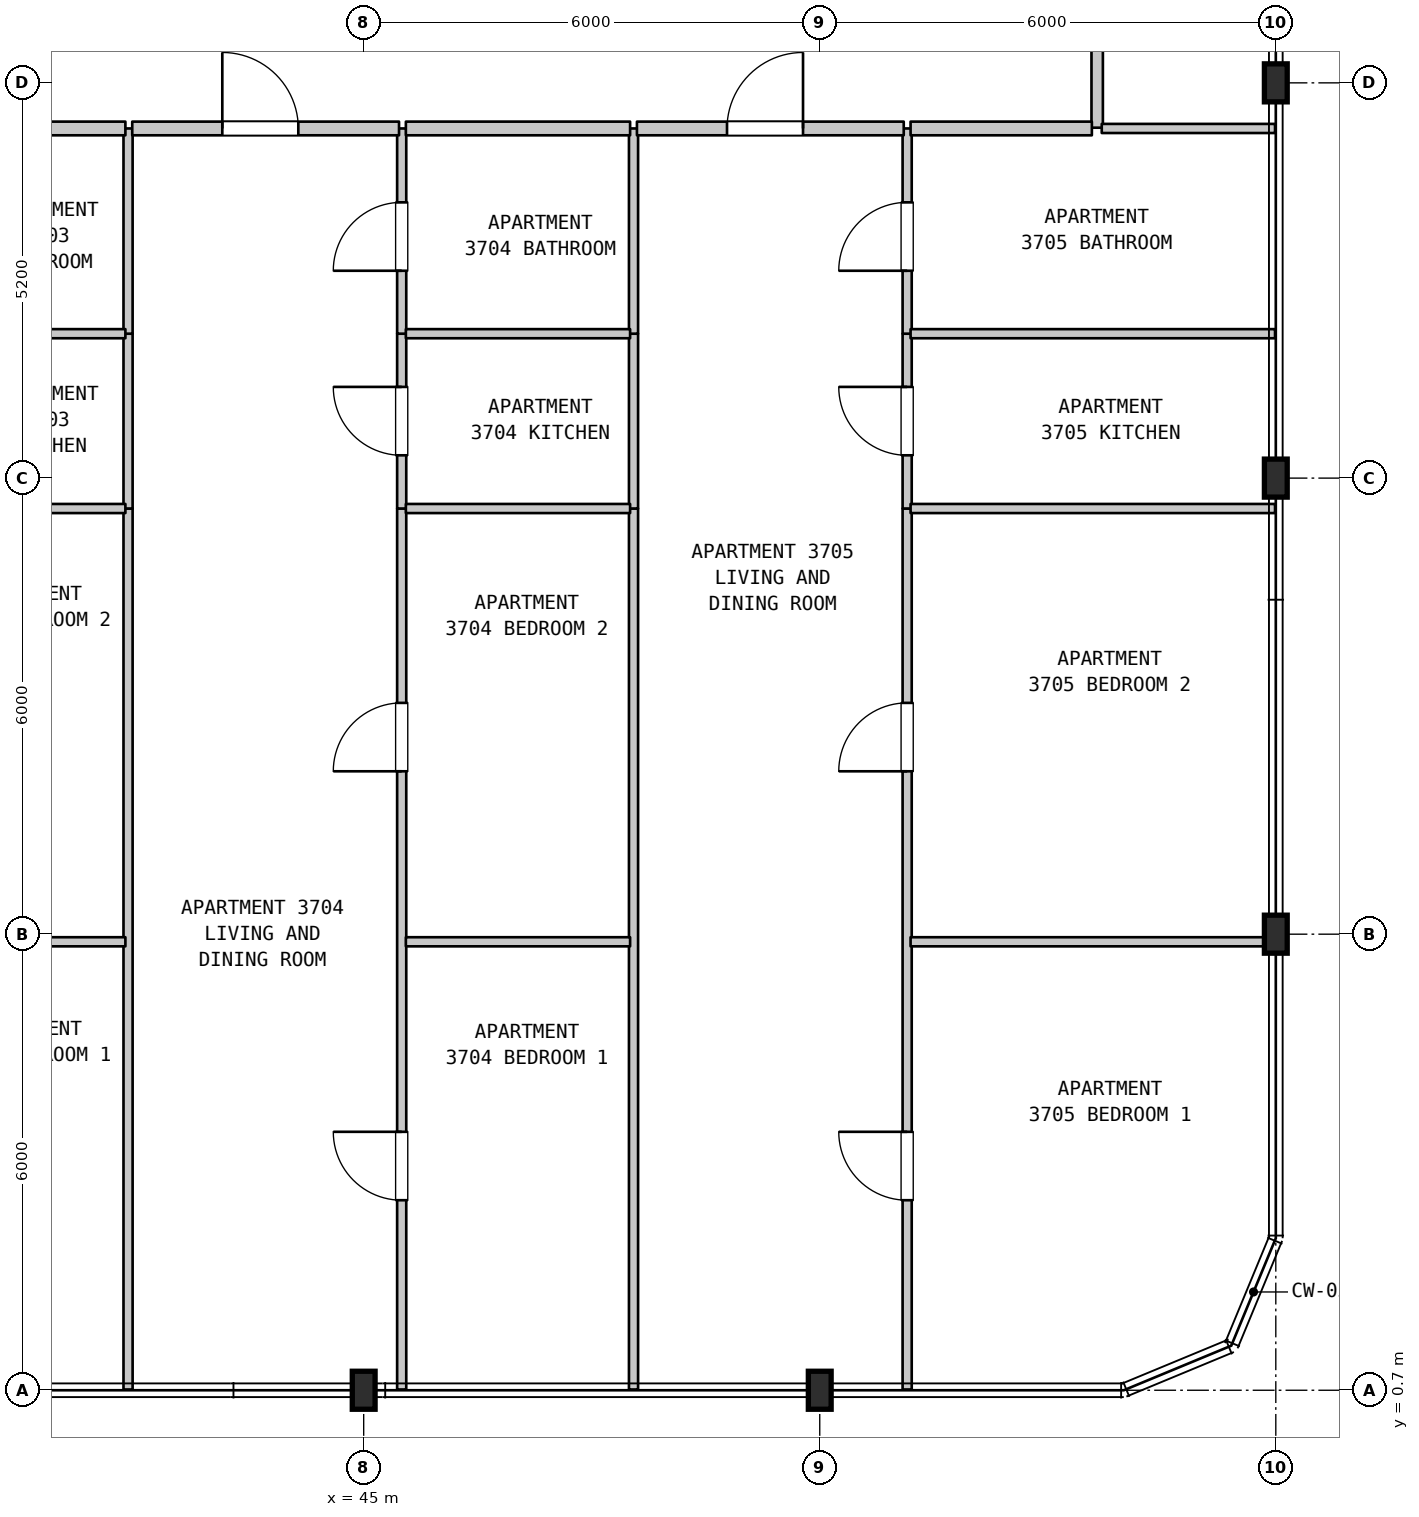
"""IFC4 building model, lengths in metres.
Left out: names, types, materials, properties, quantities, classifications, styles, units other than length and angle.
Written with IfcOpenShell. Run it as: python <this file> out.ifc"""

import sys

from ifc_helpers import new_model, si_unit, direction, frame, frame_2d, origin, origin_2d, place, context, subcontext, project, spatial, rectangle, i_section, extrude, element, fill, save


model = new_model("IFC4")
c1 = context("Model", 3, precision=1e-05, world=origin(), true_north=direction((0.0, 1.0)))
c2 = subcontext(c1, "Body", "Model", "MODEL_VIEW")
j1 = project(units=[si_unit("LENGTHUNIT", "METRE"), si_unit("PLANEANGLEUNIT", "RADIAN")], contexts=[c1])
p1 = place(None, origin())
s1 = spatial("IfcSite", under=j1, at=p1, CompositionType="ELEMENT")
p2 = place(p1, origin())
s2 = spatial("IfcBuilding", under=s1, at=p2, CompositionType="ELEMENT")
p3 = place(p2, frame((0.0, 0.0, 152.0)))
s3 = spatial("IfcBuildingStorey", under=s2, at=p3, CompositionType="ELEMENT", Elevation=152.0)
for number, where, z_axis, x_axis in (
    (1, (45.0, 0.7, 0.0), (0.0, 0.0, 1.0), (1.0, 0.0, 0.0)),
    (2, (51.0, 0.7, 0.0), (0.0, 0.0, 1.0), (1.0, 0.0, 0.0)),
    (3, (57.0, 6.7, 0.0), (0.0, 0.0, 1.0), (1.0, 0.0, 0.0)),
    (4, (57.0, 12.7, 0.0), (0.0, 0.0, 1.0), (1.0, 0.0, 0.0)),
    (5, (57.0, 17.9, 0.0), (0.0, 0.0, 1.0), (1.0, 0.0, 0.0)),
):
    element("IfcColumn", number, at=place(p3, frame(where, z_axis=z_axis, x_axis=x_axis)), inside=s3, PredefinedType="COLUMN", context=c2, shape_type="SweptSolid", body=[
        extrude(i_section(OverallWidth=0.3, OverallDepth=0.5, WebThickness=0.014, FlangeThickness=0.028, FilletRadius=0.027, at=origin_2d()), origin(), (0.0, 0.0, 1.0), 3.7),
    ])
p4 = place(p3, frame((41.9, 0.71, 0.0), z_axis=(0.0, 0.0, 1.0), x_axis=(0.0, 1.0, 0.0)))
e6 = element("IfcWall", 6, at=p4, inside=s3, PredefinedType="PARTITIONING", context=c2, shape_type="SweptSolid", body=[
    extrude(rectangle(XDim=11.59, YDim=0.12, at=frame_2d((5.795, 0.0))), origin(), (0.0, 0.0, 1.0), 3.385),
])
p5 = place(p3, frame((41.9, 12.3, 0.0), z_axis=(0.0, 0.0, 1.0), x_axis=(0.0, 1.0, 0.0)))
e7 = element("IfcWall", 7, at=p5, inside=s3, PredefinedType="PARTITIONING", context=c2, shape_type="SweptSolid", body=[
    extrude(rectangle(XDim=2.3, YDim=0.12, at=frame_2d((1.15, 0.0))), origin(), (0.0, 0.0, 1.0), 3.385),
])
p6 = place(p3, frame((41.9, 14.6, 0.0), z_axis=(0.0, 0.0, 1.0), x_axis=(0.0, 1.0, 0.0)))
e8 = element("IfcWall", 8, at=p6, inside=s3, PredefinedType="PARTITIONING", context=c2, shape_type="SweptSolid", body=[
    extrude(rectangle(XDim=2.7, YDim=0.12, at=frame_2d((1.35, 0.0))), origin(), (0.0, 0.0, 1.0), 3.385),
])
p7 = place(p3, frame((45.5, 0.71, 0.0), z_axis=(0.0, 0.0, 1.0), x_axis=(0.0, 1.0, 0.0)))
e9 = element("IfcWall", 9, at=p7, inside=s3, PredefinedType="PARTITIONING", context=c2, shape_type="SweptSolid", body=[
    extrude(rectangle(XDim=11.59, YDim=0.12, at=frame_2d((5.795, 0.0))), origin(), (0.0, 0.0, 1.0), 3.385),
])
p8 = place(p7, frame((2.49, 0.0, 0.0)))
e10 = element("IfcOpeningElement", 10, at=p8, cuts=e9, PredefinedType="OPENING", context=c2, shape_type="SweptSolid", body=[
    extrude(rectangle(XDim=0.9, YDim=2.15, at=frame_2d((0.45, 1.075))), frame((0.0, 0.07, 0.0), z_axis=(0.0, -1.0, 0.0), x_axis=(1.0, 0.0, 0.0)), (0.0, 0.0, 1.0), 0.14),
])
p9 = place(p7, frame((8.133, 0.0, 0.0)))
e11 = element("IfcOpeningElement", 11, at=p9, cuts=e9, PredefinedType="OPENING", context=c2, shape_type="SweptSolid", body=[
    extrude(rectangle(XDim=0.9, YDim=2.15, at=frame_2d((0.45, 1.075))), frame((0.0, 0.07, 0.0), z_axis=(0.0, -1.0, 0.0), x_axis=(1.0, 0.0, 0.0)), (0.0, 0.0, 1.0), 0.14),
])
p10 = place(p3, frame((45.5, 12.3, 0.0), z_axis=(0.0, 0.0, 1.0), x_axis=(0.0, 1.0, 0.0)))
e12 = element("IfcWall", 12, at=p10, inside=s3, PredefinedType="PARTITIONING", context=c2, shape_type="SweptSolid", body=[
    extrude(rectangle(XDim=2.3, YDim=0.12, at=frame_2d((1.15, 0.0))), origin(), (0.0, 0.0, 1.0), 3.385),
])
p11 = place(p10, frame((0.7, 0.0, 0.0)))
e13 = element("IfcOpeningElement", 13, at=p11, cuts=e12, PredefinedType="OPENING", context=c2, shape_type="SweptSolid", body=[
    extrude(rectangle(XDim=0.9, YDim=2.15, at=frame_2d((0.45, 1.075))), frame((0.0, 0.07, 0.0), z_axis=(0.0, -1.0, 0.0), x_axis=(1.0, 0.0, 0.0)), (0.0, 0.0, 1.0), 0.14),
])
p12 = place(p3, frame((45.5, 14.6, 0.0), z_axis=(0.0, 0.0, 1.0), x_axis=(0.0, 1.0, 0.0)))
e14 = element("IfcWall", 14, at=p12, inside=s3, PredefinedType="PARTITIONING", context=c2, shape_type="SweptSolid", body=[
    extrude(rectangle(XDim=2.7, YDim=0.12, at=frame_2d((1.35, 0.0))), origin(), (0.0, 0.0, 1.0), 3.385),
])
p13 = place(p12, frame((0.828, 0.0, 0.0)))
e15 = element("IfcOpeningElement", 15, at=p13, cuts=e14, PredefinedType="OPENING", context=c2, shape_type="SweptSolid", body=[
    extrude(rectangle(XDim=0.9, YDim=2.1, at=frame_2d((0.45, 1.05))), frame((0.0, 0.07, 0.0), z_axis=(0.0, -1.0, 0.0), x_axis=(1.0, 0.0, 0.0)), (0.0, 0.0, 1.0), 0.14),
])
p14 = place(p3, frame((48.55, 0.71, 0.0), z_axis=(0.0, 0.0, 1.0), x_axis=(0.0, 1.0, 0.0)))
e16 = element("IfcWall", 16, at=p14, inside=s3, PredefinedType="PARTITIONING", context=c2, shape_type="SweptSolid", body=[
    extrude(rectangle(XDim=11.59, YDim=0.12, at=frame_2d((5.795, 0.0))), origin(), (0.0, 0.0, 1.0), 3.385),
])
p15 = place(p3, frame((48.55, 12.3, 0.0), z_axis=(0.0, 0.0, 1.0), x_axis=(0.0, 1.0, 0.0)))
e17 = element("IfcWall", 17, at=p15, inside=s3, PredefinedType="PARTITIONING", context=c2, shape_type="SweptSolid", body=[
    extrude(rectangle(XDim=2.3, YDim=0.12, at=frame_2d((1.15, 0.0))), origin(), (0.0, 0.0, 1.0), 3.385),
])
p16 = place(p3, frame((48.55, 14.6, 0.0), z_axis=(0.0, 0.0, 1.0), x_axis=(0.0, 1.0, 0.0)))
e18 = element("IfcWall", 18, at=p16, inside=s3, PredefinedType="PARTITIONING", context=c2, shape_type="SweptSolid", body=[
    extrude(rectangle(XDim=2.7, YDim=0.12, at=frame_2d((1.35, 0.0))), origin(), (0.0, 0.0, 1.0), 3.385),
])
p17 = place(p3, frame((52.15, 0.71, 0.0), z_axis=(0.0, 0.0, 1.0), x_axis=(0.0, 1.0, 0.0)))
e19 = element("IfcWall", 19, at=p17, inside=s3, PredefinedType="PARTITIONING", context=c2, shape_type="SweptSolid", body=[
    extrude(rectangle(XDim=11.59, YDim=0.12, at=frame_2d((5.795, 0.0))), origin(), (0.0, 0.0, 1.0), 3.385),
])
p18 = place(p17, frame((2.49, 0.0, 0.0)))
e20 = element("IfcOpeningElement", 20, at=p18, cuts=e19, PredefinedType="OPENING", context=c2, shape_type="SweptSolid", body=[
    extrude(rectangle(XDim=0.9, YDim=2.15, at=frame_2d((0.45, 1.075))), frame((0.0, 0.07, 0.0), z_axis=(0.0, -1.0, 0.0), x_axis=(1.0, 0.0, 0.0)), (0.0, 0.0, 1.0), 0.14),
])
p19 = place(p17, frame((8.133, 0.0, 0.0)))
e21 = element("IfcOpeningElement", 21, at=p19, cuts=e19, PredefinedType="OPENING", context=c2, shape_type="SweptSolid", body=[
    extrude(rectangle(XDim=0.9, YDim=2.15, at=frame_2d((0.45, 1.075))), frame((0.0, 0.07, 0.0), z_axis=(0.0, -1.0, 0.0), x_axis=(1.0, 0.0, 0.0)), (0.0, 0.0, 1.0), 0.14),
])
p20 = place(p3, frame((52.15, 12.3, 0.0), z_axis=(0.0, 0.0, 1.0), x_axis=(0.0, 1.0, 0.0)))
e22 = element("IfcWall", 22, at=p20, inside=s3, PredefinedType="PARTITIONING", context=c2, shape_type="SweptSolid", body=[
    extrude(rectangle(XDim=2.3, YDim=0.12, at=frame_2d((1.15, 0.0))), origin(), (0.0, 0.0, 1.0), 3.385),
])
p21 = place(p20, frame((0.7, 0.0, 0.0)))
e23 = element("IfcOpeningElement", 23, at=p21, cuts=e22, PredefinedType="OPENING", context=c2, shape_type="SweptSolid", body=[
    extrude(rectangle(XDim=0.9, YDim=2.15, at=frame_2d((0.45, 1.075))), frame((0.0, 0.07, 0.0), z_axis=(0.0, -1.0, 0.0), x_axis=(1.0, 0.0, 0.0)), (0.0, 0.0, 1.0), 0.14),
])
p22 = place(p3, frame((52.15, 14.6, 0.0), z_axis=(0.0, 0.0, 1.0), x_axis=(0.0, 1.0, 0.0)))
e24 = element("IfcWall", 24, at=p22, inside=s3, PredefinedType="PARTITIONING", context=c2, shape_type="SweptSolid", body=[
    extrude(rectangle(XDim=2.7, YDim=0.12, at=frame_2d((1.35, 0.0))), origin(), (0.0, 0.0, 1.0), 3.385),
])
p23 = place(p22, frame((0.828, 0.0, 0.0)))
e25 = element("IfcOpeningElement", 25, at=p23, cuts=e24, PredefinedType="OPENING", context=c2, shape_type="SweptSolid", body=[
    extrude(rectangle(XDim=0.9, YDim=2.1, at=frame_2d((0.45, 1.05))), frame((0.0, 0.07, 0.0), z_axis=(0.0, -1.0, 0.0), x_axis=(1.0, 0.0, 0.0)), (0.0, 0.0, 1.0), 0.14),
])
p24 = place(p3, frame((54.65, 17.31, 0.0), z_axis=(0.0, 0.0, 1.0), x_axis=(0.0, 1.0, 0.0)))
e26 = element("IfcWall", 26, at=p24, inside=s3, PredefinedType="STANDARD", context=c2, shape_type="SweptSolid", body=[
    extrude(rectangle(XDim=2.19, YDim=0.15, at=frame_2d((1.095, 0.0))), origin(), (0.0, 0.0, 1.0), 3.385),
])
p25 = place(p3, frame((39.205, 6.6, 0.0), z_axis=(0.0, 0.0, 1.0), x_axis=(1.0, 0.0, 0.0)))
e27 = element("IfcWall", 27, at=p25, inside=s3, PredefinedType="PARTITIONING", context=c2, shape_type="SweptSolid", body=[
    extrude(rectangle(XDim=2.66, YDim=0.12, at=frame_2d((1.33, 0.0))), origin(), (0.0, 0.0, 1.0), 2.785),
])
p26 = place(p3, frame((45.555, 6.6, 0.0), z_axis=(0.0, 0.0, 1.0), x_axis=(1.0, 0.0, 0.0)))
e28 = element("IfcWall", 28, at=p26, inside=s3, PredefinedType="PARTITIONING", context=c2, shape_type="SweptSolid", body=[
    extrude(rectangle(XDim=2.95, YDim=0.12, at=frame_2d((1.475, 0.0))), origin(), (0.0, 0.0, 1.0), 2.785),
])
p27 = place(p3, frame((52.195, 6.6, 0.0), z_axis=(0.0, 0.0, 1.0), x_axis=(1.0, 0.0, 0.0)))
e29 = element("IfcWall", 29, at=p27, inside=s3, PredefinedType="PARTITIONING", context=c2, shape_type="SweptSolid", body=[
    extrude(rectangle(XDim=4.795, YDim=0.12, at=frame_2d((2.397, 0.0))), origin(), (0.0, 0.0, 1.0), 2.785),
])
p28 = place(p3, frame((39.205, 12.3, 0.0), z_axis=(0.0, 0.0, 1.0), x_axis=(1.0, 0.0, 0.0)))
e30 = element("IfcWall", 30, at=p28, inside=s3, PredefinedType="PARTITIONING", context=c2, shape_type="SweptSolid", body=[
    extrude(rectangle(XDim=2.66, YDim=0.12, at=frame_2d((1.33, 0.0))), origin(), (0.0, 0.0, 1.0), 3.385),
])
p29 = place(p3, frame((45.555, 12.3, 0.0), z_axis=(0.0, 0.0, 1.0), x_axis=(1.0, 0.0, 0.0)))
e31 = element("IfcWall", 31, at=p29, inside=s3, PredefinedType="PARTITIONING", context=c2, shape_type="SweptSolid", body=[
    extrude(rectangle(XDim=2.95, YDim=0.12, at=frame_2d((1.475, 0.0))), origin(), (0.0, 0.0, 1.0), 3.385),
])
p30 = place(p3, frame((52.195, 12.3, 0.0), z_axis=(0.0, 0.0, 1.0), x_axis=(1.0, 0.0, 0.0)))
e32 = element("IfcWall", 32, at=p30, inside=s3, PredefinedType="PARTITIONING", context=c2, shape_type="SweptSolid", body=[
    extrude(rectangle(XDim=4.795, YDim=0.12, at=frame_2d((2.397, 0.0))), origin(), (0.0, 0.0, 1.0), 3.385),
])
p31 = place(p3, frame((39.205, 14.6, 0.0), z_axis=(0.0, 0.0, 1.0), x_axis=(1.0, 0.0, 0.0)))
e33 = element("IfcWall", 33, at=p31, inside=s3, PredefinedType="PARTITIONING", context=c2, shape_type="SweptSolid", body=[
    extrude(rectangle(XDim=2.66, YDim=0.12, at=frame_2d((1.33, 0.0))), origin(), (0.0, 0.0, 1.0), 3.385),
])
p32 = place(p3, frame((45.555, 14.6, 0.0), z_axis=(0.0, 0.0, 1.0), x_axis=(1.0, 0.0, 0.0)))
e34 = element("IfcWall", 34, at=p32, inside=s3, PredefinedType="PARTITIONING", context=c2, shape_type="SweptSolid", body=[
    extrude(rectangle(XDim=2.95, YDim=0.12, at=frame_2d((1.475, 0.0))), origin(), (0.0, 0.0, 1.0), 3.385),
])
p33 = place(p3, frame((52.195, 14.6, 0.0), z_axis=(0.0, 0.0, 1.0), x_axis=(1.0, 0.0, 0.0)))
e35 = element("IfcWall", 35, at=p33, inside=s3, PredefinedType="PARTITIONING", context=c2, shape_type="SweptSolid", body=[
    extrude(rectangle(XDim=4.795, YDim=0.12, at=frame_2d((2.397, 0.0))), origin(), (0.0, 0.0, 1.0), 3.385),
])
p34 = place(p3, frame((39.205, 17.3, 0.0), z_axis=(0.0, 0.0, 1.0), x_axis=(1.0, 0.0, 0.0)))
e36 = element("IfcWall", 36, at=p34, inside=s3, PredefinedType="STANDARD", context=c2, shape_type="SweptSolid", body=[
    extrude(rectangle(XDim=2.66, YDim=0.18, at=frame_2d((1.33, 0.0))), origin(), (0.0, 0.0, 1.0), 3.385),
])
p35 = place(p3, frame((41.955, 17.3, 0.0), z_axis=(0.0, 0.0, 1.0), x_axis=(1.0, 0.0, 0.0)))
e37 = element("IfcWall", 37, at=p35, inside=s3, PredefinedType="STANDARD", context=c2, shape_type="SweptSolid", body=[
    extrude(rectangle(XDim=3.51, YDim=0.18, at=frame_2d((1.755, 0.0))), origin(), (0.0, 0.0, 1.0), 3.385),
])
p36 = place(p35, frame((1.185, 0.0, 0.0)))
e38 = element("IfcOpeningElement", 38, at=p36, cuts=e37, PredefinedType="OPENING", context=c2, shape_type="SweptSolid", body=[
    extrude(rectangle(XDim=1.0, YDim=2.15, at=frame_2d((0.5, 1.075))), frame((0.0, 0.1, 0.0), z_axis=(0.0, -1.0, 0.0), x_axis=(1.0, 0.0, 0.0)), (0.0, 0.0, 1.0), 0.2),
])
p37 = place(p3, frame((45.555, 17.3, 0.0), z_axis=(0.0, 0.0, 1.0), x_axis=(1.0, 0.0, 0.0)))
e39 = element("IfcWall", 39, at=p37, inside=s3, PredefinedType="STANDARD", context=c2, shape_type="SweptSolid", body=[
    extrude(rectangle(XDim=2.95, YDim=0.18, at=frame_2d((1.475, 0.0))), origin(), (0.0, 0.0, 1.0), 3.385),
])
p38 = place(p3, frame((48.595, 17.3, 0.0), z_axis=(0.0, 0.0, 1.0), x_axis=(1.0, 0.0, 0.0)))
e40 = element("IfcWall", 40, at=p38, inside=s3, PredefinedType="STANDARD", context=c2, shape_type="SweptSolid", body=[
    extrude(rectangle(XDim=3.51, YDim=0.18, at=frame_2d((1.755, 0.0))), origin(), (0.0, 0.0, 1.0), 3.385),
])
p39 = place(p38, frame((1.185, 0.0, 0.0)))
e41 = element("IfcOpeningElement", 41, at=p39, cuts=e40, PredefinedType="OPENING", context=c2, shape_type="SweptSolid", body=[
    extrude(rectangle(XDim=1.0, YDim=2.15, at=frame_2d((0.5, 1.075))), frame((0.0, 0.1, 0.0), z_axis=(0.0, -1.0, 0.0), x_axis=(1.0, 0.0, 0.0)), (0.0, 0.0, 1.0), 0.2),
])
p40 = place(p3, frame((52.195, 17.3, 0.0), z_axis=(0.0, 0.0, 1.0), x_axis=(1.0, 0.0, 0.0)))
e42 = element("IfcWall", 42, at=p40, inside=s3, PredefinedType="STANDARD", context=c2, shape_type="SweptSolid", body=[
    extrude(rectangle(XDim=2.385, YDim=0.18, at=frame_2d((1.192, 0.0))), origin(), (0.0, 0.0, 1.0), 3.385),
])
p41 = place(p3, frame((54.71, 17.3, 0.0), z_axis=(0.0, 0.0, 1.0), x_axis=(1.0, 0.0, 0.0)))
e43 = element("IfcWall", 43, at=p41, inside=s3, PredefinedType="PARTITIONING", context=c2, shape_type="SweptSolid", body=[
    extrude(rectangle(XDim=2.28, YDim=0.12, at=frame_2d((1.14, 0.0))), origin(), (0.0, 0.0, 1.0), 3.385),
])
p42 = place(p8, origin())
e44 = element("IfcDoor", 44, at=p42, inside=s3, OperationType="SINGLE_SWING_RIGHT", PredefinedType="DOOR", context=c2, shape_type="SweptSolid", body=[
    extrude(rectangle(XDim=0.9, YDim=2.15, at=frame_2d((0.45, 1.075))), frame((0.0, 0.025, 0.0), z_axis=(0.0, -1.0, 0.0), x_axis=(1.0, 0.0, 0.0)), (0.0, 0.0, 1.0), 0.05),
])
fill(e10, e44)
p43 = place(p9, origin())
e45 = element("IfcDoor", 45, at=p43, inside=s3, OperationType="SINGLE_SWING_LEFT", PredefinedType="DOOR", context=c2, shape_type="SweptSolid", body=[
    extrude(rectangle(XDim=0.9, YDim=2.15, at=frame_2d((0.45, 1.075))), frame((0.0, 0.025, 0.0), z_axis=(0.0, -1.0, 0.0), x_axis=(1.0, 0.0, 0.0)), (0.0, 0.0, 1.0), 0.05),
])
fill(e11, e45)
p44 = place(p11, origin())
e46 = element("IfcDoor", 46, at=p44, inside=s3, OperationType="SINGLE_SWING_RIGHT", PredefinedType="DOOR", context=c2, shape_type="SweptSolid", body=[
    extrude(rectangle(XDim=0.9, YDim=2.15, at=frame_2d((0.45, 1.075))), frame((0.0, 0.025, 0.0), z_axis=(0.0, -1.0, 0.0), x_axis=(1.0, 0.0, 0.0)), (0.0, 0.0, 1.0), 0.05),
])
fill(e13, e46)
p45 = place(p13, origin())
e47 = element("IfcDoor", 47, at=p45, inside=s3, OperationType="SINGLE_SWING_LEFT", PredefinedType="DOOR", context=c2, shape_type="SweptSolid", body=[
    extrude(rectangle(XDim=0.9, YDim=2.1, at=frame_2d((0.45, 1.05))), frame((0.0, 0.025, 0.0), z_axis=(0.0, -1.0, 0.0), x_axis=(1.0, 0.0, 0.0)), (0.0, 0.0, 1.0), 0.05),
])
fill(e15, e47)
p46 = place(p18, origin())
e48 = element("IfcDoor", 48, at=p46, inside=s3, OperationType="SINGLE_SWING_RIGHT", PredefinedType="DOOR", context=c2, shape_type="SweptSolid", body=[
    extrude(rectangle(XDim=0.9, YDim=2.15, at=frame_2d((0.45, 1.075))), frame((0.0, 0.025, 0.0), z_axis=(0.0, -1.0, 0.0), x_axis=(1.0, 0.0, 0.0)), (0.0, 0.0, 1.0), 0.05),
])
fill(e20, e48)
p47 = place(p19, origin())
e49 = element("IfcDoor", 49, at=p47, inside=s3, OperationType="SINGLE_SWING_LEFT", PredefinedType="DOOR", context=c2, shape_type="SweptSolid", body=[
    extrude(rectangle(XDim=0.9, YDim=2.15, at=frame_2d((0.45, 1.075))), frame((0.0, 0.025, 0.0), z_axis=(0.0, -1.0, 0.0), x_axis=(1.0, 0.0, 0.0)), (0.0, 0.0, 1.0), 0.05),
])
fill(e21, e49)
p48 = place(p21, origin())
e50 = element("IfcDoor", 50, at=p48, inside=s3, OperationType="SINGLE_SWING_RIGHT", PredefinedType="DOOR", context=c2, shape_type="SweptSolid", body=[
    extrude(rectangle(XDim=0.9, YDim=2.15, at=frame_2d((0.45, 1.075))), frame((0.0, 0.025, 0.0), z_axis=(0.0, -1.0, 0.0), x_axis=(1.0, 0.0, 0.0)), (0.0, 0.0, 1.0), 0.05),
])
fill(e23, e50)
p49 = place(p23, origin())
e51 = element("IfcDoor", 51, at=p49, inside=s3, OperationType="SINGLE_SWING_LEFT", PredefinedType="DOOR", context=c2, shape_type="SweptSolid", body=[
    extrude(rectangle(XDim=0.9, YDim=2.1, at=frame_2d((0.45, 1.05))), frame((0.0, 0.025, 0.0), z_axis=(0.0, -1.0, 0.0), x_axis=(1.0, 0.0, 0.0)), (0.0, 0.0, 1.0), 0.05),
])
fill(e25, e51)
p50 = place(p36, origin())
e52 = element("IfcDoor", 52, at=p50, inside=s3, OperationType="SINGLE_SWING_LEFT", PredefinedType="DOOR", context=c2, shape_type="SweptSolid", body=[
    extrude(rectangle(XDim=1.0, YDim=2.15, at=frame_2d((0.5, 1.075))), frame((0.0, 0.025, 0.0), z_axis=(0.0, -1.0, 0.0), x_axis=(1.0, 0.0, 0.0)), (0.0, 0.0, 1.0), 0.05),
])
fill(e38, e52)
p51 = place(p39, origin())
e53 = element("IfcDoor", 53, at=p51, inside=s3, OperationType="SINGLE_SWING_RIGHT", PredefinedType="DOOR", context=c2, shape_type="SweptSolid", body=[
    extrude(rectangle(XDim=1.0, YDim=2.15, at=frame_2d((0.5, 1.075))), frame((0.0, 0.025, 0.0), z_axis=(0.0, -1.0, 0.0), x_axis=(1.0, 0.0, 0.0)), (0.0, 0.0, 1.0), 0.05),
])
fill(e41, e53)
save(model, sys.argv[1])
